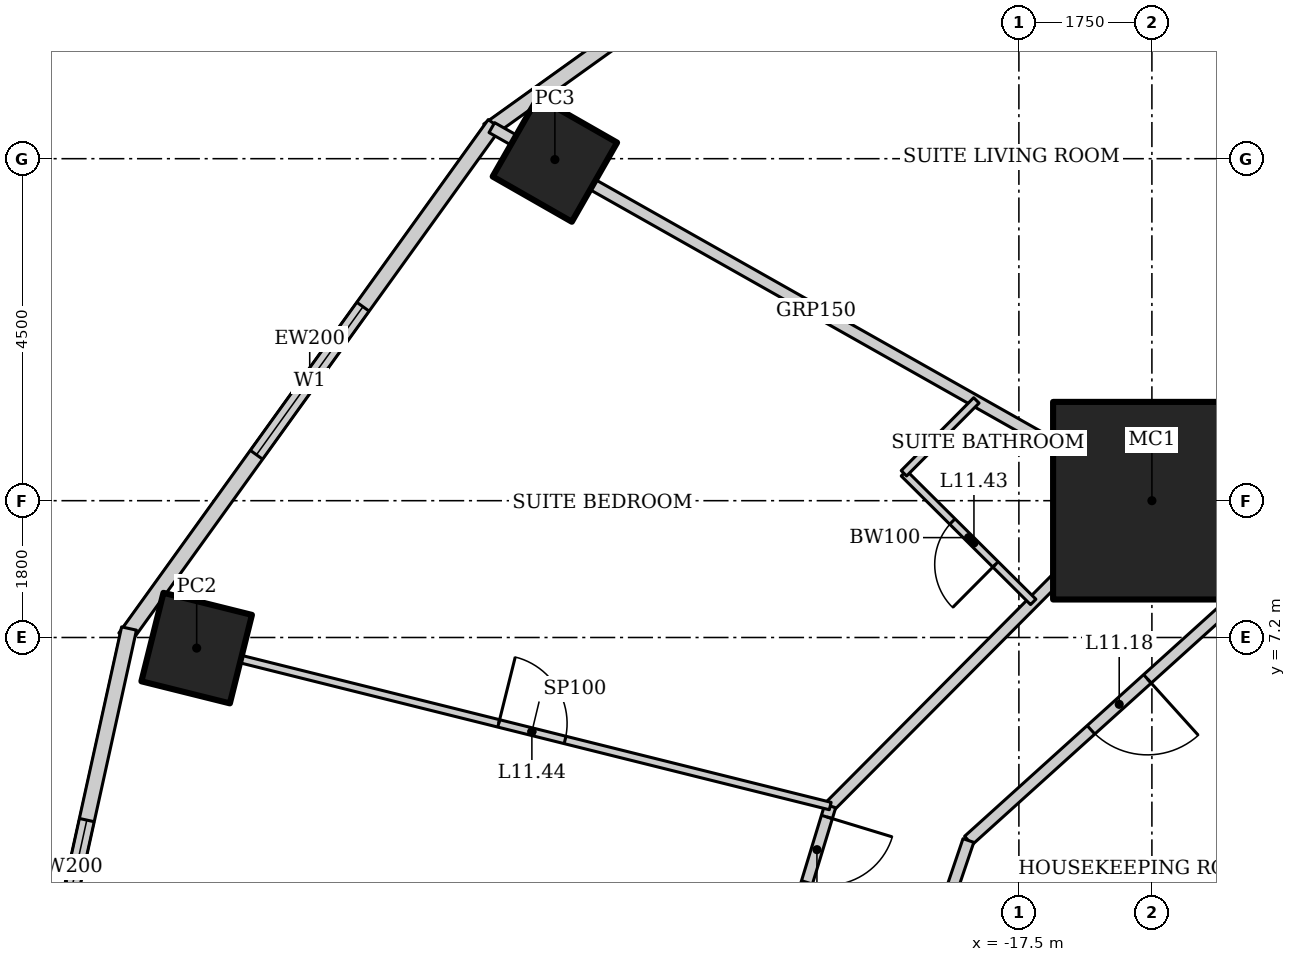
"""IFC4 building model, lengths in metres.
Left out: names, types, materials, properties, quantities, classifications, styles, units other than length and angle.
Written with IfcOpenShell. Run it as: python <this file> out.ifc"""

import sys

from ifc_helpers import new_model, si_unit, direction, frame, frame_2d, origin, origin_2d, place, context, subcontext, project, spatial, rectangle, hollow_rectangle, extrude, element, fill, save


model = new_model("IFC4")
c1 = context("Model", 3, precision=1e-05, world=origin(), true_north=direction((0.0, 1.0)))
c2 = subcontext(c1, "Body", "Model", "MODEL_VIEW")
j1 = project(units=[si_unit("LENGTHUNIT", "METRE"), si_unit("PLANEANGLEUNIT", "RADIAN")], contexts=[c1])
p1 = place(None, origin())
s1 = spatial("IfcSite", under=j1, at=p1, CompositionType="ELEMENT")
p2 = place(p1, origin())
s2 = spatial("IfcBuilding", under=s1, at=p2, CompositionType="ELEMENT")
p3 = place(p2, frame((0.0, 0.0, 55.0)))
s3 = spatial("IfcBuildingStorey", under=s2, at=p3, CompositionType="ELEMENT", Elevation=55.0)
p4 = place(p3, frame((-15.75, 9.0, 0.0), z_axis=(0.0, 0.0, 1.0), x_axis=(1.0, 0.0, 0.0)))
e1 = element("IfcColumn", 1, at=p4, inside=s3, PredefinedType="COLUMN", context=c2, shape_type="SweptSolid", body=[
    extrude(hollow_rectangle(XDim=2.6, YDim=2.6, WallThickness=0.13, at=origin_2d()), origin(), (0.0, 0.0, 1.0), 3.6),
])
p5 = place(p3, frame((-23.605, 13.489, 0.0), z_axis=(0.0, 0.0, 1.0), x_axis=(0.496139221777, 0.86824298017, 0.0)))
e2 = element("IfcColumn", 2, at=p5, inside=s3, PredefinedType="COLUMN", context=c2, shape_type="SweptSolid", body=[
    extrude(hollow_rectangle(XDim=1.2, YDim=1.2, WallThickness=0.12, at=origin_2d()), origin(), (0.0, 0.0, 1.0), 3.6),
])
p6 = place(p3, frame((-28.318, 7.06, 0.0), z_axis=(0.0, 0.0, 1.0), x_axis=(0.2419218956, 0.970295726276, 0.0)))
e3 = element("IfcColumn", 3, at=p6, inside=s3, PredefinedType="COLUMN", context=c2, shape_type="SweptSolid", body=[
    extrude(hollow_rectangle(XDim=1.2, YDim=1.2, WallThickness=0.1, at=origin_2d()), origin(), (0.0, 0.0, 1.0), 3.6),
])
p7 = place(p3, frame((-17.929, 18.572, 0.0), z_axis=(0.0, 0.0, 1.0), x_axis=(-0.812791321576, -0.582554948112, 0.0)))
e4 = element("IfcWall", 4, at=p7, inside=s3, PredefinedType="SOLIDWALL", context=c2, shape_type="SweptSolid", body=[
    extrude(rectangle(XDim=8.063, YDim=0.2, at=frame_2d((4.032, 0.0))), origin(), (0.0, 0.0, 1.0), 3.45),
])
p8 = place(p7, frame((2.832, 0.0, 0.5)))
e5 = element("IfcOpeningElement", 5, at=p8, cuts=e4, PredefinedType="OPENING", context=c2, shape_type="SweptSolid", body=[
    extrude(rectangle(XDim=2.4, YDim=2.2, at=frame_2d((1.2, 1.1))), frame((0.0, 0.11, 0.0), z_axis=(0.0, -1.0, 0.0), x_axis=(1.0, 0.0, 0.0)), (0.0, 0.0, 1.0), 0.22),
])
p9 = place(p3, frame((-24.4, 13.957, 0.0), z_axis=(0.0, 0.0, 1.0), x_axis=(-0.583937613703, -0.811798536155, 0.0)))
e6 = element("IfcWall", 6, at=p9, inside=s3, PredefinedType="SOLIDWALL", context=c2, shape_type="SweptSolid", body=[
    extrude(rectangle(XDim=8.323, YDim=0.2, at=frame_2d((4.162, 0.0))), origin(), (0.0, 0.0, 1.0), 3.45),
])
p10 = place(p9, frame((2.961, 0.0, 0.5)))
e7 = element("IfcOpeningElement", 7, at=p10, cuts=e6, PredefinedType="OPENING", context=c2, shape_type="SweptSolid", body=[
    extrude(rectangle(XDim=2.4, YDim=2.2, at=frame_2d((1.2, 1.1))), frame((0.0, 0.11, 0.0), z_axis=(0.0, -1.0, 0.0), x_axis=(1.0, 0.0, 0.0)), (0.0, 0.0, 1.0), 0.22),
])
p11 = place(p3, frame((-29.208, 7.318, 0.0), z_axis=(0.0, 0.0, 1.0), x_axis=(-0.215238065514, -0.976561608478, 0.0)))
e8 = element("IfcWall", 8, at=p11, inside=s3, PredefinedType="SOLIDWALL", context=c2, shape_type="SweptSolid", body=[
    extrude(rectangle(XDim=7.562, YDim=0.2, at=frame_2d((3.781, 0.0))), origin(), (0.0, 0.0, 1.0), 3.45),
])
p12 = place(p11, frame((2.581, 0.0, 0.5)))
e9 = element("IfcOpeningElement", 9, at=p12, cuts=e8, PredefinedType="OPENING", context=c2, shape_type="SweptSolid", body=[
    extrude(rectangle(XDim=2.4, YDim=2.2, at=frame_2d((1.2, 1.1))), frame((0.0, 0.11, 0.0), z_axis=(0.0, -1.0, 0.0), x_axis=(1.0, 0.0, 0.0)), (0.0, 0.0, 1.0), 0.22),
])
p13 = place(p3, frame((-24.435, 13.909, 0.0), z_axis=(0.0, 0.0, 1.0), x_axis=(0.870612006791, -0.491970256856, 0.0)))
e10 = element("IfcWall", 10, at=p13, inside=s3, PredefinedType="PARTITIONING", context=c2, shape_type="SweptSolid", body=[
    extrude(rectangle(XDim=9.802, YDim=0.15, at=frame_2d((4.901, 0.0))), origin(), (0.0, 0.0, 1.0), 2.693),
])
p14 = place(p3, frame((-11.147, 11.544, 0.0), z_axis=(0.0, 0.0, 1.0), x_axis=(-0.888333171507, -0.459199495209, 0.0)))
e11 = element("IfcWall", 11, at=p14, inside=s3, PredefinedType="PARTITIONING", context=c2, shape_type="SweptSolid", body=[
    extrude(rectangle(XDim=5.351, YDim=0.15, at=frame_2d((2.676, 0.0))), origin(), (0.0, 0.0, 1.0), 3.45),
])
p15 = place(p14, frame((0.15, 0.0, 0.0)))
e12 = element("IfcOpeningElement", 12, at=p15, cuts=e11, PredefinedType="OPENING", context=c2, shape_type="SweptSolid", body=[
    extrude(rectangle(XDim=0.9, YDim=2.1, at=frame_2d((0.45, 1.05))), frame((0.0, 0.085, 0.0), z_axis=(0.0, -1.0, 0.0), x_axis=(1.0, 0.0, 0.0)), (0.0, 0.0, 1.0), 0.17),
])
p16 = place(p3, frame((-15.901, 9.086, 0.0), z_axis=(0.0, 0.0, 1.0), x_axis=(-0.705121546414, -0.709086457904, 0.0)))
e13 = element("IfcWall", 13, at=p16, inside=s3, PredefinedType="PARTITIONING", context=c2, shape_type="SweptSolid", body=[
    extrude(rectangle(XDim=5.788, YDim=0.15, at=frame_2d((2.894, 0.0))), origin(), (0.0, 0.0, 1.0), 3.45),
])
p17 = place(p3, frame((-19.982, 4.982, 0.0), z_axis=(0.0, 0.0, 1.0), x_axis=(-0.291383581394, -0.95660629754, 0.0)))
e14 = element("IfcWall", 14, at=p17, inside=s3, PredefinedType="PARTITIONING", context=c2, shape_type="SweptSolid", body=[
    extrude(rectangle(XDim=5.208, YDim=0.15, at=frame_2d((2.604, 0.0))), origin(), (0.0, 0.0, 1.0), 3.45),
])
p18 = place(p17, frame((0.15, 0.0, 0.0)))
e15 = element("IfcOpeningElement", 15, at=p18, cuts=e14, PredefinedType="OPENING", context=c2, shape_type="SweptSolid", body=[
    extrude(rectangle(XDim=0.9, YDim=2.1, at=frame_2d((0.45, 1.05))), frame((0.0, 0.085, 0.0), z_axis=(0.0, -1.0, 0.0), x_axis=(1.0, 0.0, 0.0)), (0.0, 0.0, 1.0), 0.17),
])
p19 = place(p3, frame((-14.196, 8.112, 0.0), z_axis=(0.0, 0.0, 1.0), x_axis=(-0.742194222, -0.670184852731, 0.0)))
e16 = element("IfcWall", 16, at=p19, inside=s3, PredefinedType="PARTITIONING", context=c2, shape_type="SweptSolid", body=[
    extrude(rectangle(XDim=5.347, YDim=0.15, at=frame_2d((2.673, 0.0))), origin(), (0.0, 0.0, 1.0), 3.45),
])
p20 = place(p19, frame((2.173, 0.0, 0.0)))
e17 = element("IfcOpeningElement", 17, at=p20, cuts=e16, PredefinedType="OPENING", context=c2, shape_type="SweptSolid", body=[
    extrude(rectangle(XDim=1.0, YDim=2.1, at=frame_2d((0.5, 1.05))), frame((0.0, 0.085, 0.0), z_axis=(0.0, -1.0, 0.0), x_axis=(1.0, 0.0, 0.0)), (0.0, 0.0, 1.0), 0.17),
])
p21 = place(p3, frame((-16.944, 17.545, 0.0), z_axis=(0.0, 0.0, 1.0), x_axis=(0.694680670522, -0.71931826475, 0.0)))
e18 = element("IfcWall", 18, at=p21, inside=s3, PredefinedType="PARTITIONING", context=c2, shape_type="SweptSolid", body=[
    extrude(rectangle(XDim=8.344, YDim=0.1, at=frame_2d((4.172, 0.0))), origin(), (0.0, 0.0, 1.0), 2.528),
])
p22 = place(p21, frame((3.722, 0.0, 0.0)))
e19 = element("IfcOpeningElement", 19, at=p22, cuts=e18, PredefinedType="OPENING", context=c2, shape_type="SweptSolid", body=[
    extrude(rectangle(XDim=0.9, YDim=2.1, at=frame_2d((0.45, 1.05))), frame((0.0, 0.06, 0.0), z_axis=(0.0, -1.0, 0.0), x_axis=(1.0, 0.0, 0.0)), (0.0, 0.0, 1.0), 0.12),
])
p23 = place(p3, frame((-17.311, 7.668, 0.0), z_axis=(0.0, 0.0, 1.0), x_axis=(-0.709138392716, 0.705069315724, 0.0)))
e20 = element("IfcWall", 20, at=p23, inside=s3, PredefinedType="PARTITIONING", context=c2, shape_type="SweptSolid", body=[
    extrude(rectangle(XDim=2.4, YDim=0.1, at=frame_2d((1.2, 0.0))), origin(), (0.0, 0.0, 1.0), 3.45),
])
p24 = place(p23, frame((0.7, 0.0, 0.0)))
e21 = element("IfcOpeningElement", 21, at=p24, cuts=e20, PredefinedType="OPENING", context=c2, shape_type="SweptSolid", body=[
    extrude(rectangle(XDim=0.8, YDim=2.1, at=frame_2d((0.4, 1.05))), frame((0.0, 0.06, 0.0), z_axis=(0.0, -1.0, 0.0), x_axis=(1.0, 0.0, 0.0)), (0.0, 0.0, 1.0), 0.12),
])
p25 = place(p3, frame((-19.013, 9.36, 0.0), z_axis=(0.0, 0.0, 1.0), x_axis=(0.7051187611, 0.709089227633, 0.0)))
e22 = element("IfcWall", 22, at=p25, inside=s3, PredefinedType="PARTITIONING", context=c2, shape_type="SweptSolid", body=[
    extrude(rectangle(XDim=1.353, YDim=0.1, at=frame_2d((0.676, 0.0))), origin(), (0.0, 0.0, 1.0), 3.45),
])
p26 = place(p3, frame((-27.833, 6.939, 0.0), z_axis=(0.0, 0.0, 1.0), x_axis=(0.97029673161, -0.24191786339, 0.0)))
e23 = element("IfcWall", 23, at=p26, inside=s3, PredefinedType="PARTITIONING", context=c2, shape_type="SweptSolid", body=[
    extrude(rectangle(XDim=8.091, YDim=0.1, at=frame_2d((4.045, 0.0))), origin(), (0.0, 0.0, 1.0), 2.333),
])
p27 = place(p26, frame((3.595, 0.0, 0.0)))
e24 = element("IfcOpeningElement", 24, at=p27, cuts=e23, PredefinedType="OPENING", context=c2, shape_type="SweptSolid", body=[
    extrude(rectangle(XDim=0.9, YDim=2.1, at=frame_2d((0.45, 1.05))), frame((0.0, 0.06, 0.0), z_axis=(0.0, -1.0, 0.0), x_axis=(1.0, 0.0, 0.0)), (0.0, 0.0, 1.0), 0.12),
])
p28 = place(p3, frame((-18.164, 4.529, 0.0), z_axis=(0.0, 0.0, 1.0), x_axis=(-0.321124194945, -0.947037090837, 0.0)))
e25 = element("IfcWall", 25, at=p28, inside=s3, PredefinedType="PARTITIONING", context=c2, shape_type="SweptSolid", body=[
    extrude(rectangle(XDim=2.317, YDim=0.15, at=frame_2d((1.158, 0.0))), origin(), (0.0, 0.0, 1.0), 3.45),
])
p29 = place(p10, origin())
e26 = element("IfcWindow", 26, at=p29, inside=s3, PartitioningType="SINGLE_PANEL", PredefinedType="WINDOW", context=c2, shape_type="SweptSolid", body=[
    extrude(rectangle(XDim=2.4, YDim=2.2, at=frame_2d((1.2, 1.1))), frame((0.0, 0.03, 0.0), z_axis=(0.0, -1.0, 0.0), x_axis=(1.0, 0.0, 0.0)), (0.0, 0.0, 1.0), 0.06),
])
fill(e7, e26)
p30 = place(p12, origin())
e27 = element("IfcWindow", 27, at=p30, inside=s3, PartitioningType="SINGLE_PANEL", PredefinedType="WINDOW", context=c2, shape_type="SweptSolid", body=[
    extrude(rectangle(XDim=2.4, YDim=2.2, at=frame_2d((1.2, 1.1))), frame((0.0, 0.03, 0.0), z_axis=(0.0, -1.0, 0.0), x_axis=(1.0, 0.0, 0.0)), (0.0, 0.0, 1.0), 0.06),
])
fill(e9, e27)
p31 = place(p20, origin())
e28 = element("IfcDoor", 28, at=p31, inside=s3, OperationType="SINGLE_SWING_LEFT", PredefinedType="DOOR", context=c2, shape_type="SweptSolid", body=[
    extrude(rectangle(XDim=1.0, YDim=2.1, at=frame_2d((0.5, 1.05))), frame((0.0, 0.025, 0.0), z_axis=(0.0, -1.0, 0.0), x_axis=(1.0, 0.0, 0.0)), (0.0, 0.0, 1.0), 0.05),
])
fill(e17, e28)
p32 = place(p24, origin())
e29 = element("IfcDoor", 29, at=p32, inside=s3, OperationType="SINGLE_SWING_LEFT", PredefinedType="DOOR", context=c2, shape_type="SweptSolid", body=[
    extrude(rectangle(XDim=0.8, YDim=2.1, at=frame_2d((0.4, 1.05))), frame((0.0, 0.025, 0.0), z_axis=(0.0, -1.0, 0.0), x_axis=(1.0, 0.0, 0.0)), (0.0, 0.0, 1.0), 0.05),
])
fill(e21, e29)
p33 = place(p27, origin())
e30 = element("IfcDoor", 30, at=p33, inside=s3, OperationType="SINGLE_SWING_LEFT", PredefinedType="DOOR", context=c2, shape_type="SweptSolid", body=[
    extrude(rectangle(XDim=0.9, YDim=2.1, at=frame_2d((0.45, 1.05))), frame((0.0, 0.025, 0.0), z_axis=(0.0, -1.0, 0.0), x_axis=(1.0, 0.0, 0.0)), (0.0, 0.0, 1.0), 0.05),
])
fill(e24, e30)
p34 = place(p18, origin())
e31 = element("IfcDoor", 31, at=p34, inside=s3, OperationType="SINGLE_SWING_LEFT", PredefinedType="DOOR", context=c2, shape_type="SweptSolid", body=[
    extrude(rectangle(XDim=0.9, YDim=2.1, at=frame_2d((0.45, 1.05))), frame((0.0, 0.025, 0.0), z_axis=(0.0, -1.0, 0.0), x_axis=(1.0, 0.0, 0.0)), (0.0, 0.0, 1.0), 0.05),
])
fill(e15, e31)
save(model, sys.argv[1])
